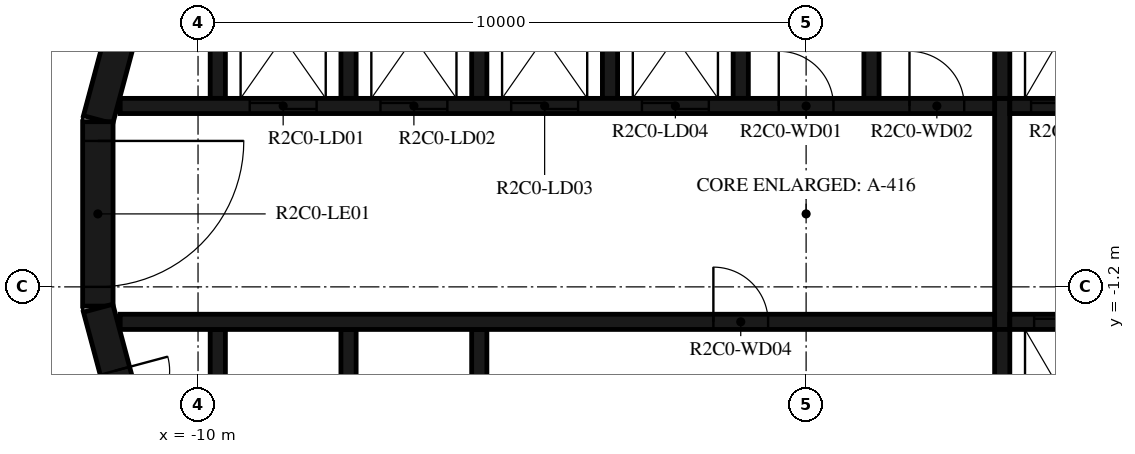
"""IFC4 building model, lengths in metres.
Left out: names, types, materials, properties, quantities, classifications, styles, units other than length and angle.
Written with IfcOpenShell. Run it as: python <this file> out.ifc"""

import sys

from ifc_helpers import new_model, si_unit, direction, frame, frame_2d, origin, place, context, subcontext, project, spatial, polyline, rectangle, outline, extrude, element, fill, save


model = new_model("IFC4")
c1 = context("Model", 3, precision=1e-05, world=origin(), true_north=direction((0.0, 1.0)))
c2 = subcontext(c1, "Body", "Model", "MODEL_VIEW")
j1 = project(units=[si_unit("LENGTHUNIT", "METRE"), si_unit("PLANEANGLEUNIT", "RADIAN")], contexts=[c1])
p1 = place(None, origin())
s1 = spatial("IfcSite", under=j1, at=p1, CompositionType="ELEMENT")
p2 = place(p1, origin())
s2 = spatial("IfcBuilding", under=s1, at=p2, CompositionType="ELEMENT")
p3 = place(p2, frame((0.0, 0.0, 104.7)))
s3 = spatial("IfcBuildingStorey", under=s2, at=p3, CompositionType="ELEMENT", Elevation=104.7)
p4 = place(p3, frame((-10.858, 4.479, 0.0), z_axis=(0.0, 0.0, 1.0), x_axis=(-0.258734743916, -0.965948410781, 0.0)))
e1 = element("IfcWall", 1, at=p4, inside=s3, PredefinedType="SHEAR", context=c2, shape_type="SweptSolid", body=[
    extrude(rectangle(XDim=3.033, YDim=0.5, at=frame_2d((1.516, 0.0))), origin(), (0.0, 0.0, 1.0), 3.05),
])
p5 = place(p3, frame((-11.647, 1.516, 0.0), z_axis=(0.0, 0.0, 1.0), x_axis=(0.0, -1.0, 0.0)))
e2 = element("IfcWall", 2, at=p5, inside=s3, PredefinedType="SHEAR", context=c2, shape_type="SweptSolid", body=[
    extrude(rectangle(XDim=3.033, YDim=0.5, at=frame_2d((1.516, 0.0))), origin(), (0.0, 0.0, 1.0), 3.05),
])
p6 = place(p5, frame((0.316, 0.0, 0.0)))
e3 = element("IfcOpeningElement", 3, at=p6, cuts=e2, PredefinedType="OPENING", context=c2, shape_type="SweptSolid", body=[
    extrude(rectangle(XDim=2.4, YDim=2.1, at=frame_2d((1.2, 1.05))), frame((0.0, 0.26, 0.0), z_axis=(0.0, -1.0, 0.0), x_axis=(1.0, 0.0, 0.0)), (0.0, 0.0, 1.0), 0.52),
])
p7 = place(p3, frame((-11.643, -1.55, 0.0), z_axis=(0.0, 0.0, 1.0), x_axis=(0.258734743916, -0.965948410781, 0.0)))
e4 = element("IfcWall", 4, at=p7, inside=s3, PredefinedType="SHEAR", context=c2, shape_type="SweptSolid", body=[
    extrude(rectangle(XDim=3.033, YDim=0.5, at=frame_2d((1.516, 0.0))), origin(), (0.0, 0.0, 1.0), 3.05),
])
p8 = place(p7, frame((1.066, 0.0, 0.0)))
e5 = element("IfcOpeningElement", 5, at=p8, cuts=e4, PredefinedType="OPENING", context=c2, shape_type="SweptSolid", body=[
    extrude(rectangle(XDim=0.9, YDim=2.1, at=frame_2d((0.45, 1.05))), frame((0.0, 0.26, 0.0), z_axis=(0.0, -1.0, 0.0), x_axis=(1.0, 0.0, 0.0)), (0.0, 0.0, 1.0), 0.52),
])
p9 = place(p3, origin())
e6 = element("IfcWall", 6, at=p9, inside=s3, PredefinedType="SHEAR", context=c2, shape_type="SweptSolid", body=[
    extrude(outline(polyline([(-9.55, 4.8), (-7.65, 4.8), (-7.65, 1.9), (-7.4, 1.9), (-7.4, 4.8), (-5.5, 4.8), (-5.5, 1.9), (-5.25, 1.9), (-5.25, 4.8), (-3.35, 4.8), (-3.35, 1.9), (-3.1, 1.9), (-3.1, 4.8), (-1.2, 4.8), (-1.2, 1.9), (-0.95, 1.9), (-0.95, 4.8), (0.95, 4.8), (0.95, 1.9), (1.2, 1.9), (1.2, 4.8), (3.1, 4.8), (3.1, 1.9), (3.35, 1.9), (3.35, 4.8), (5.25, 4.8), (5.25, 1.9), (5.5, 1.9), (5.5, 4.8), (7.4, 4.8), (7.4, 1.9), (7.65, 1.9), (7.65, 4.8), (9.55, 4.8), (9.55, 1.9), (9.8, 1.9), (9.8, 4.8), (9.8, 5.05), (-9.8, 5.05), (-9.8, 4.8), (-9.8, 1.9), (-9.55, 1.9), (-9.55, 4.8)])), origin(), (0.0, 0.0, 1.0), 3.05),
])
p10 = place(p3, origin())
e7 = element("IfcWall", 7, at=p10, inside=s3, PredefinedType="SHEAR", context=c2, shape_type="SweptSolid", body=[
    extrude(outline(polyline([(9.8, -5.05), (9.8, -4.8), (9.8, -1.9), (9.55, -1.9), (9.55, -4.8), (7.65, -4.8), (7.65, -1.9), (7.4, -1.9), (7.4, -4.8), (5.5, -4.8), (5.5, -1.9), (5.25, -1.9), (5.25, -4.8), (3.35, -4.8), (3.35, -1.9), (3.1, -1.9), (3.1, -4.8), (-5.25, -4.8), (-5.25, -1.9), (-5.5, -1.9), (-5.5, -4.8), (-7.4, -4.8), (-7.4, -1.9), (-7.65, -1.9), (-7.65, -4.8), (-9.55, -4.8), (-9.55, -1.9), (-9.8, -1.9), (-9.8, -4.8), (-9.8, -5.05), (9.8, -5.05)])), origin(), (0.0, 0.0, 1.0), 3.05),
])
p11 = place(p3, frame((-11.28, 1.775, 0.0), z_axis=(0.0, 0.0, 1.0), x_axis=(1.0, 0.0, 0.0)))
e8 = element("IfcWall", 8, at=p11, inside=s3, PredefinedType="SHEAR", context=c2, shape_type="SweptSolid", body=[
    extrude(rectangle(XDim=14.38, YDim=0.25, at=frame_2d((7.19, 0.0))), origin(), (0.0, 0.0, 1.0), 3.05),
])
p12 = place(p11, frame((2.13, 0.0, 0.0)))
e9 = element("IfcOpeningElement", 9, at=p12, cuts=e8, PredefinedType="OPENING", context=c2, shape_type="SweptSolid", body=[
    extrude(rectangle(XDim=1.1, YDim=2.1, at=frame_2d((0.55, 1.05))), frame((0.0, 0.135, 0.0), z_axis=(0.0, -1.0, 0.0), x_axis=(1.0, 0.0, 0.0)), (0.0, 0.0, 1.0), 0.27),
])
p13 = place(p11, frame((4.28, 0.0, 0.0)))
e10 = element("IfcOpeningElement", 10, at=p13, cuts=e8, PredefinedType="OPENING", context=c2, shape_type="SweptSolid", body=[
    extrude(rectangle(XDim=1.1, YDim=2.1, at=frame_2d((0.55, 1.05))), frame((0.0, 0.135, 0.0), z_axis=(0.0, -1.0, 0.0), x_axis=(1.0, 0.0, 0.0)), (0.0, 0.0, 1.0), 0.27),
])
p14 = place(p11, frame((6.43, 0.0, 0.0)))
e11 = element("IfcOpeningElement", 11, at=p14, cuts=e8, PredefinedType="OPENING", context=c2, shape_type="SweptSolid", body=[
    extrude(rectangle(XDim=1.1, YDim=2.1, at=frame_2d((0.55, 1.05))), frame((0.0, 0.135, 0.0), z_axis=(0.0, -1.0, 0.0), x_axis=(1.0, 0.0, 0.0)), (0.0, 0.0, 1.0), 0.27),
])
p15 = place(p11, frame((8.58, 0.0, 0.0)))
e12 = element("IfcOpeningElement", 12, at=p15, cuts=e8, PredefinedType="OPENING", context=c2, shape_type="SweptSolid", body=[
    extrude(rectangle(XDim=1.1, YDim=2.1, at=frame_2d((0.55, 1.05))), frame((0.0, 0.135, 0.0), z_axis=(0.0, -1.0, 0.0), x_axis=(1.0, 0.0, 0.0)), (0.0, 0.0, 1.0), 0.27),
])
p16 = place(p11, frame((10.83, 0.0, 0.0)))
e13 = element("IfcOpeningElement", 13, at=p16, cuts=e8, PredefinedType="OPENING", context=c2, shape_type="SweptSolid", body=[
    extrude(rectangle(XDim=0.9, YDim=2.1, at=frame_2d((0.45, 1.05))), frame((0.0, 0.135, 0.0), z_axis=(0.0, -1.0, 0.0), x_axis=(1.0, 0.0, 0.0)), (0.0, 0.0, 1.0), 0.27),
])
p17 = place(p11, frame((12.98, 0.0, 0.0)))
e14 = element("IfcOpeningElement", 14, at=p17, cuts=e8, PredefinedType="OPENING", context=c2, shape_type="SweptSolid", body=[
    extrude(rectangle(XDim=0.9, YDim=2.1, at=frame_2d((0.45, 1.05))), frame((0.0, 0.135, 0.0), z_axis=(0.0, -1.0, 0.0), x_axis=(1.0, 0.0, 0.0)), (0.0, 0.0, 1.0), 0.27),
])
p18 = place(p3, frame((3.35, 1.775, 0.0), z_axis=(0.0, 0.0, 1.0), x_axis=(1.0, 0.0, 0.0)))
e15 = element("IfcWall", 15, at=p18, inside=s3, PredefinedType="SHEAR", context=c2, shape_type="SweptSolid", body=[
    extrude(rectangle(XDim=7.93, YDim=0.25, at=frame_2d((3.965, 0.0))), origin(), (0.0, 0.0, 1.0), 3.05),
])
p19 = place(p18, frame((0.35, 0.0, 0.0)))
e16 = element("IfcOpeningElement", 16, at=p19, cuts=e15, PredefinedType="OPENING", context=c2, shape_type="SweptSolid", body=[
    extrude(rectangle(XDim=1.2, YDim=2.4, at=frame_2d((0.6, 1.2))), frame((0.0, 0.135, 0.0), z_axis=(0.0, -1.0, 0.0), x_axis=(1.0, 0.0, 0.0)), (0.0, 0.0, 1.0), 0.27),
])
p20 = place(p18, frame((2.5, 0.0, 0.0)))
e17 = element("IfcOpeningElement", 17, at=p20, cuts=e15, PredefinedType="OPENING", context=c2, shape_type="SweptSolid", body=[
    extrude(rectangle(XDim=1.2, YDim=2.4, at=frame_2d((0.6, 1.2))), frame((0.0, 0.135, 0.0), z_axis=(0.0, -1.0, 0.0), x_axis=(1.0, 0.0, 0.0)), (0.0, 0.0, 1.0), 0.27),
])
p21 = place(p18, frame((4.8, 0.0, 0.0)))
e18 = element("IfcOpeningElement", 18, at=p21, cuts=e15, PredefinedType="OPENING", context=c2, shape_type="SweptSolid", body=[
    extrude(rectangle(XDim=0.9, YDim=2.1, at=frame_2d((0.45, 1.05))), frame((0.0, 0.135, 0.0), z_axis=(0.0, -1.0, 0.0), x_axis=(1.0, 0.0, 0.0)), (0.0, 0.0, 1.0), 0.27),
])
p22 = place(p3, frame((-11.28, -1.775, 0.0), z_axis=(0.0, 0.0, 1.0), x_axis=(1.0, 0.0, 0.0)))
e19 = element("IfcWall", 19, at=p22, inside=s3, PredefinedType="SHEAR", context=c2, shape_type="SweptSolid", body=[
    extrude(rectangle(XDim=14.38, YDim=0.25, at=frame_2d((7.19, 0.0))), origin(), (0.0, 0.0, 1.0), 3.05),
])
p23 = place(p22, frame((9.755, 0.0, 0.0)))
e20 = element("IfcOpeningElement", 20, at=p23, cuts=e19, PredefinedType="OPENING", context=c2, shape_type="SweptSolid", body=[
    extrude(rectangle(XDim=0.9, YDim=2.1, at=frame_2d((0.45, 1.05))), frame((0.0, 0.135, 0.0), z_axis=(0.0, -1.0, 0.0), x_axis=(1.0, 0.0, 0.0)), (0.0, 0.0, 1.0), 0.27),
])
p24 = place(p3, frame((3.35, -1.775, 0.0), z_axis=(0.0, 0.0, 1.0), x_axis=(1.0, 0.0, 0.0)))
e21 = element("IfcWall", 21, at=p24, inside=s3, PredefinedType="SHEAR", context=c2, shape_type="SweptSolid", body=[
    extrude(rectangle(XDim=7.93, YDim=0.25, at=frame_2d((3.965, 0.0))), origin(), (0.0, 0.0, 1.0), 3.05),
])
p25 = place(p24, frame((0.4, 0.0, 0.0)))
e22 = element("IfcOpeningElement", 22, at=p25, cuts=e21, PredefinedType="OPENING", context=c2, shape_type="SweptSolid", body=[
    extrude(rectangle(XDim=1.1, YDim=2.4, at=frame_2d((0.55, 1.2))), frame((0.0, 0.135, 0.0), z_axis=(0.0, -1.0, 0.0), x_axis=(1.0, 0.0, 0.0)), (0.0, 0.0, 1.0), 0.27),
])
p26 = place(p24, frame((2.55, 0.0, 0.0)))
e23 = element("IfcOpeningElement", 23, at=p26, cuts=e21, PredefinedType="OPENING", context=c2, shape_type="SweptSolid", body=[
    extrude(rectangle(XDim=1.1, YDim=2.4, at=frame_2d((0.55, 1.2))), frame((0.0, 0.135, 0.0), z_axis=(0.0, -1.0, 0.0), x_axis=(1.0, 0.0, 0.0)), (0.0, 0.0, 1.0), 0.27),
])
p27 = place(p24, frame((4.7, 0.0, 0.0)))
e24 = element("IfcOpeningElement", 24, at=p27, cuts=e21, PredefinedType="OPENING", context=c2, shape_type="SweptSolid", body=[
    extrude(rectangle(XDim=1.1, YDim=2.4, at=frame_2d((0.55, 1.2))), frame((0.0, 0.135, 0.0), z_axis=(0.0, -1.0, 0.0), x_axis=(1.0, 0.0, 0.0)), (0.0, 0.0, 1.0), 0.27),
])
p28 = place(p3, frame((3.225, -1.9, 0.0), z_axis=(0.0, 0.0, 1.0), x_axis=(0.0, 1.0, 0.0)))
e25 = element("IfcWall", 25, at=p28, inside=s3, PredefinedType="SHEAR", context=c2, shape_type="SweptSolid", body=[
    extrude(rectangle(XDim=3.8, YDim=0.25, at=frame_2d((1.9, 0.0))), origin(), (0.0, 0.0, 1.0), 3.05),
])
p29 = place(p3, frame((-11.1, 8.829, 0.0), z_axis=(0.0, 0.0, 1.0), x_axis=(-0.398741918631, -0.917063183388, 0.0)))
e26 = element("IfcWall", 26, at=p29, inside=s3, PredefinedType="STANDARD", context=c2, shape_type="SweptSolid", body=[
    extrude(rectangle(XDim=7.342, YDim=0.2, at=frame_2d((3.671, 0.0))), origin(), (0.0, 0.0, 1.0), 3.05),
])
p30 = place(p6, origin())
e27 = element("IfcDoor", 27, at=p30, inside=s3, OperationType="DOUBLE_DOOR_SINGLE_SWING", PredefinedType="DOOR", context=c2, shape_type="SweptSolid", body=[
    extrude(rectangle(XDim=2.4, YDim=2.1, at=frame_2d((1.2, 1.05))), frame((0.0, 0.025, 0.0), z_axis=(0.0, -1.0, 0.0), x_axis=(1.0, 0.0, 0.0)), (0.0, 0.0, 1.0), 0.05),
])
fill(e3, e27)
p31 = place(p12, origin())
e28 = element("IfcDoor", 28, at=p31, inside=s3, OperationType="DOUBLE_DOOR_SLIDING", PredefinedType="DOOR", context=c2, shape_type="SweptSolid", body=[
    extrude(rectangle(XDim=1.1, YDim=2.1, at=frame_2d((0.55, 1.05))), frame((0.0, 0.025, 0.0), z_axis=(0.0, -1.0, 0.0), x_axis=(1.0, 0.0, 0.0)), (0.0, 0.0, 1.0), 0.05),
])
fill(e9, e28)
p32 = place(p13, origin())
e29 = element("IfcDoor", 29, at=p32, inside=s3, OperationType="DOUBLE_DOOR_SLIDING", PredefinedType="DOOR", context=c2, shape_type="SweptSolid", body=[
    extrude(rectangle(XDim=1.1, YDim=2.1, at=frame_2d((0.55, 1.05))), frame((0.0, 0.025, 0.0), z_axis=(0.0, -1.0, 0.0), x_axis=(1.0, 0.0, 0.0)), (0.0, 0.0, 1.0), 0.05),
])
fill(e10, e29)
p33 = place(p14, origin())
e30 = element("IfcDoor", 30, at=p33, inside=s3, OperationType="DOUBLE_DOOR_SLIDING", PredefinedType="DOOR", context=c2, shape_type="SweptSolid", body=[
    extrude(rectangle(XDim=1.1, YDim=2.1, at=frame_2d((0.55, 1.05))), frame((0.0, 0.025, 0.0), z_axis=(0.0, -1.0, 0.0), x_axis=(1.0, 0.0, 0.0)), (0.0, 0.0, 1.0), 0.05),
])
fill(e11, e30)
p34 = place(p15, origin())
e31 = element("IfcDoor", 31, at=p34, inside=s3, OperationType="DOUBLE_DOOR_SLIDING", PredefinedType="DOOR", context=c2, shape_type="SweptSolid", body=[
    extrude(rectangle(XDim=1.1, YDim=2.1, at=frame_2d((0.55, 1.05))), frame((0.0, 0.025, 0.0), z_axis=(0.0, -1.0, 0.0), x_axis=(1.0, 0.0, 0.0)), (0.0, 0.0, 1.0), 0.05),
])
fill(e12, e31)
p35 = place(p19, origin())
e32 = element("IfcDoor", 32, at=p35, inside=s3, OperationType="DOUBLE_DOOR_SLIDING", PredefinedType="DOOR", context=c2, shape_type="SweptSolid", body=[
    extrude(rectangle(XDim=1.2, YDim=2.4, at=frame_2d((0.6, 1.2))), frame((0.0, 0.025, 0.0), z_axis=(0.0, -1.0, 0.0), x_axis=(1.0, 0.0, 0.0)), (0.0, 0.0, 1.0), 0.05),
])
fill(e16, e32)
p36 = place(p25, origin())
e33 = element("IfcDoor", 33, at=p36, inside=s3, OperationType="DOUBLE_DOOR_SLIDING", PredefinedType="DOOR", context=c2, shape_type="SweptSolid", body=[
    extrude(rectangle(XDim=1.1, YDim=2.4, at=frame_2d((0.55, 1.2))), frame((0.0, 0.025, 0.0), z_axis=(0.0, -1.0, 0.0), x_axis=(1.0, 0.0, 0.0)), (0.0, 0.0, 1.0), 0.05),
])
fill(e22, e33)
p37 = place(p16, origin())
e34 = element("IfcDoor", 34, at=p37, inside=s3, OperationType="SINGLE_SWING_RIGHT", PredefinedType="DOOR", context=c2, shape_type="SweptSolid", body=[
    extrude(rectangle(XDim=0.9, YDim=2.1, at=frame_2d((0.45, 1.05))), frame((0.0, 0.025, 0.0), z_axis=(0.0, -1.0, 0.0), x_axis=(1.0, 0.0, 0.0)), (0.0, 0.0, 1.0), 0.05),
])
fill(e13, e34)
p38 = place(p17, origin())
e35 = element("IfcDoor", 35, at=p38, inside=s3, OperationType="SINGLE_SWING_LEFT", PredefinedType="DOOR", context=c2, shape_type="SweptSolid", body=[
    extrude(rectangle(XDim=0.9, YDim=2.1, at=frame_2d((0.45, 1.05))), frame((0.0, 0.025, 0.0), z_axis=(0.0, -1.0, 0.0), x_axis=(1.0, 0.0, 0.0)), (0.0, 0.0, 1.0), 0.05),
])
fill(e14, e35)
p39 = place(p23, origin())
e36 = element("IfcDoor", 36, at=p39, inside=s3, OperationType="SINGLE_SWING_LEFT", PredefinedType="DOOR", context=c2, shape_type="SweptSolid", body=[
    extrude(rectangle(XDim=0.9, YDim=2.1, at=frame_2d((0.45, 1.05))), frame((0.0, 0.025, 0.0), z_axis=(0.0, -1.0, 0.0), x_axis=(1.0, 0.0, 0.0)), (0.0, 0.0, 1.0), 0.05),
])
fill(e20, e36)
p40 = place(p8, origin())
e37 = element("IfcDoor", 37, at=p40, inside=s3, OperationType="SINGLE_SWING_RIGHT", PredefinedType="DOOR", context=c2, shape_type="SweptSolid", body=[
    extrude(rectangle(XDim=0.9, YDim=2.1, at=frame_2d((0.45, 1.05))), frame((0.0, 0.025, 0.0), z_axis=(0.0, -1.0, 0.0), x_axis=(1.0, 0.0, 0.0)), (0.0, 0.0, 1.0), 0.05),
])
fill(e5, e37)
save(model, sys.argv[1])
